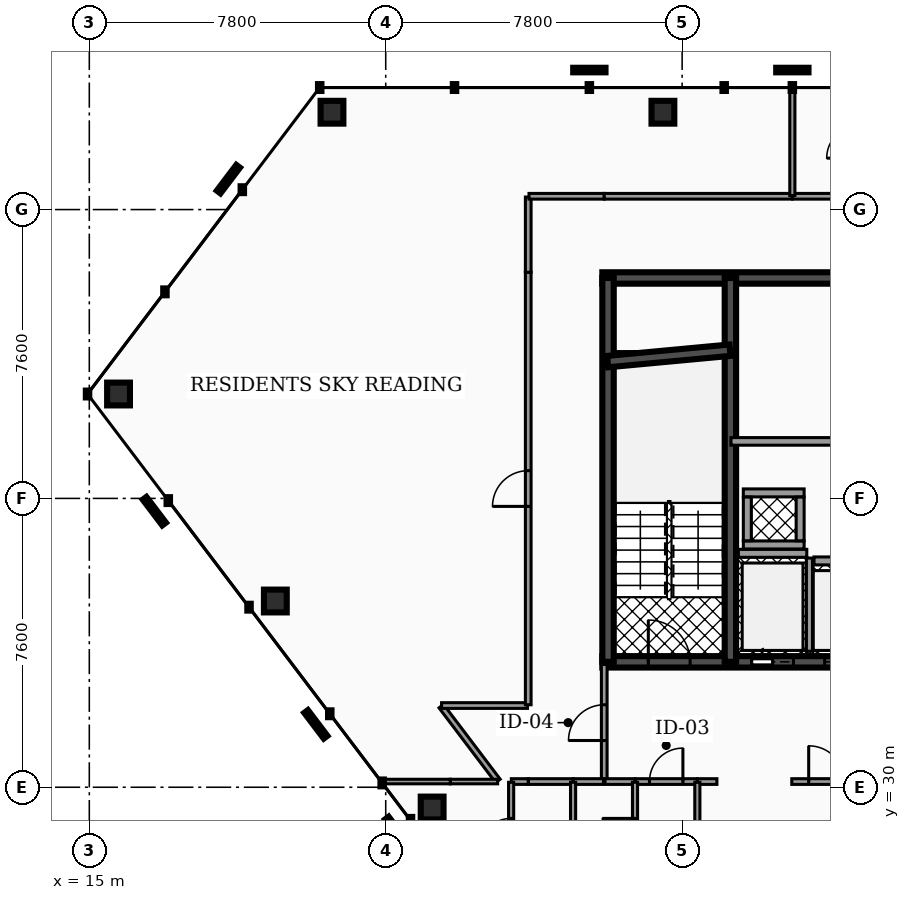
"""IFC4 building model, lengths in metres.
Left out: names, types, materials, properties, quantities, classifications, styles, units other than length and angle.
Written with IfcOpenShell. Run it as: python <this file> out.ifc"""

import sys

from ifc_helpers import new_model, si_unit, direction, frame, frame_2d, origin, origin_2d, place, context, subcontext, project, spatial, rectangle, hollow_rectangle, extrude, element, fill, save


model = new_model("IFC4")
c1 = context("Model", 3, precision=1e-05, world=origin(), true_north=direction((0.0, 1.0)))
c2 = subcontext(c1, "Body", "Model", "MODEL_VIEW")
j1 = project(units=[si_unit("LENGTHUNIT", "METRE"), si_unit("PLANEANGLEUNIT", "RADIAN")], contexts=[c1])
p1 = place(None, origin())
s1 = spatial("IfcSite", under=j1, at=p1, CompositionType="ELEMENT")
p2 = place(p1, origin())
s2 = spatial("IfcBuilding", under=s1, at=p2, CompositionType="ELEMENT")
p3 = place(p2, frame((0.0, 0.0, 215.56)))
s3 = spatial("IfcBuildingStorey", under=s2, at=p3, CompositionType="ELEMENT", Elevation=215.56)
p4 = place(p3, frame((28.5, 43.4, 0.0), z_axis=(0.0, 0.0, 1.0), x_axis=(1.0, 0.0, 0.0)))
e1 = element("IfcWall", 1, at=p4, inside=s3, PredefinedType="SHEAR", context=c2, shape_type="SweptSolid", body=[
    extrude(rectangle(XDim=19.86, YDim=0.3, at=frame_2d((9.93, 0.0))), origin(), (0.0, 0.0, 1.0), 3.18),
])
p5 = place(p3, frame((28.5, 33.3, 0.0), z_axis=(0.0, 0.0, 1.0), x_axis=(1.0, 0.0, 0.0)))
e2 = element("IfcWall", 2, at=p5, inside=s3, PredefinedType="SHEAR", context=c2, shape_type="SweptSolid", body=[
    extrude(rectangle(XDim=19.86, YDim=0.3, at=frame_2d((9.93, 0.0))), origin(), (0.0, 0.0, 1.0), 3.18),
])
p6 = place(p5, frame((3.93, 0.0, 0.0)))
e3 = element("IfcOpeningElement", 3, at=p6, cuts=e2, PredefinedType="OPENING", context=c2, shape_type="SweptSolid", body=[
    extrude(rectangle(XDim=1.1, YDim=2.15, at=frame_2d((0.55, 1.075))), frame((0.0, 0.16, 0.0), z_axis=(0.0, -1.0, 0.0), x_axis=(1.0, 0.0, 0.0)), (0.0, 0.0, 1.0), 0.32),
])
p7 = place(p5, frame((14.77, 0.0, 0.0)))
e4 = element("IfcOpeningElement", 4, at=p7, cuts=e2, PredefinedType="OPENING", context=c2, shape_type="SweptSolid", body=[
    extrude(rectangle(XDim=1.1, YDim=2.15, at=frame_2d((0.55, 1.075))), frame((0.0, 0.16, 0.0), z_axis=(0.0, -1.0, 0.0), x_axis=(1.0, 0.0, 0.0)), (0.0, 0.0, 1.0), 0.32),
])
p8 = place(p5, frame((11.25, 0.0, 0.0)))
e5 = element("IfcOpeningElement", 5, at=p8, cuts=e2, PredefinedType="OPENING", context=c2, shape_type="SweptSolid", body=[
    extrude(rectangle(XDim=1.0, YDim=2.1, at=frame_2d((0.5, 1.05))), frame((0.0, 0.16, 0.0), z_axis=(0.0, -1.0, 0.0), x_axis=(1.0, 0.0, 0.0)), (0.0, 0.0, 1.0), 0.32),
])
p9 = place(p5, frame((12.95, 0.0, 0.0)))
e6 = element("IfcOpeningElement", 6, at=p9, cuts=e2, PredefinedType="OPENING", context=c2, shape_type="SweptSolid", body=[
    extrude(rectangle(XDim=1.0, YDim=2.1, at=frame_2d((0.5, 1.05))), frame((0.0, 0.16, 0.0), z_axis=(0.0, -1.0, 0.0), x_axis=(1.0, 0.0, 0.0)), (0.0, 0.0, 1.0), 0.32),
])
p10 = place(p5, frame((5.85, 0.0, 0.0)))
e7 = element("IfcOpeningElement", 7, at=p10, cuts=e2, PredefinedType="OPENING", context=c2, shape_type="SweptSolid", body=[
    extrude(rectangle(XDim=1.0, YDim=2.1, at=frame_2d((0.5, 1.05))), frame((0.0, 0.16, 0.0), z_axis=(0.0, -1.0, 0.0), x_axis=(1.0, 0.0, 0.0)), (0.0, 0.0, 1.0), 0.32),
])
p11 = place(p5, frame((1.21, 0.0, 0.0)))
e8 = element("IfcOpeningElement", 8, at=p11, cuts=e2, PredefinedType="OPENING", context=c2, shape_type="SweptSolid", body=[
    extrude(rectangle(XDim=1.1, YDim=2.2, at=frame_2d((0.55, 1.1))), frame((0.0, 0.16, 0.0), z_axis=(0.0, -1.0, 0.0), x_axis=(1.0, 0.0, 0.0)), (0.0, 0.0, 1.0), 0.32),
])
p12 = place(p5, frame((9.34, 0.0, 0.0)))
e9 = element("IfcOpeningElement", 9, at=p12, cuts=e2, PredefinedType="OPENING", context=c2, shape_type="SweptSolid", body=[
    extrude(rectangle(XDim=1.12, YDim=2.05, at=frame_2d((0.56, 1.025))), frame((0.0, 0.16, 0.0), z_axis=(0.0, -1.0, 0.0), x_axis=(1.0, 0.0, 0.0)), (0.0, 0.0, 1.0), 0.32),
])
p13 = place(p5, frame((17.55, 0.0, 0.0)))
e10 = element("IfcOpeningElement", 10, at=p13, cuts=e2, PredefinedType="OPENING", context=c2, shape_type="SweptSolid", body=[
    extrude(rectangle(XDim=1.1, YDim=2.2, at=frame_2d((0.55, 1.1))), frame((0.0, 0.16, 0.0), z_axis=(0.0, -1.0, 0.0), x_axis=(1.0, 0.0, 0.0)), (0.0, 0.0, 1.0), 0.32),
])
for number, where, z_axis, x_axis in (
    (11, (28.65, 33.3, 0.0), (0.0, 0.0, 1.0), (0.0, 1.0, 0.0)),
    (12, (31.87, 33.3, 0.0), (0.0, 0.0, 1.0), (0.0, 1.0, 0.0)),
):
    element("IfcWall", number, at=place(p3, frame(where, z_axis=z_axis, x_axis=x_axis)), inside=s3, PredefinedType="SHEAR", context=c2, shape_type="SweptSolid", body=[
        extrude(rectangle(XDim=10.1, YDim=0.3, at=frame_2d((5.05, 0.0))), origin(), (0.0, 0.0, 1.0), 3.18),
    ])
p14 = place(p3, frame((28.64, 41.2, 0.0), z_axis=(0.0, 0.0, 1.0), x_axis=(0.995687118776, 0.092774789157, 0.0)))
e13 = element("IfcWall", 13, at=p14, inside=s3, PredefinedType="SHEAR", context=c2, shape_type="SweptSolid", body=[
    extrude(rectangle(XDim=3.234, YDim=0.3, at=frame_2d((1.617, 0.0))), origin(), (0.0, 0.0, 1.0), 3.18),
])
p15 = place(p3, frame((30.094, 47.761, 0.0), z_axis=(-0.040247349512, -0.03664425346, 0.998517575982), x_axis=(0.673233426826, -0.739430019004, 0.0)))
e14 = element("IfcColumn", 14, at=p15, inside=s3, PredefinedType="COLUMN", context=c2, shape_type="SweptSolid", body=[
    extrude(hollow_rectangle(XDim=0.6, YDim=0.6, WallThickness=0.03, at=origin_2d()), origin(), (0.0, 0.0, 1.0), 3.185),
])
p16 = place(p3, frame((21.386, 47.761, 0.0), z_axis=(-0.074369002674, -0.03657241078, 0.996559938093), x_axis=(0.441295281394, -0.89736195296, 0.0)))
e15 = element("IfcColumn", 15, at=p16, inside=s3, PredefinedType="COLUMN", context=c2, shape_type="SweptSolid", body=[
    extrude(hollow_rectangle(XDim=0.6, YDim=0.6, WallThickness=0.03, at=origin_2d()), origin(), (0.0, 0.0, 1.0), 3.191),
])
p17 = place(p3, frame((15.769, 40.347, 0.0), z_axis=(0.053875568613, 0.132295296129, 0.989745107454), x_axis=(-0.92614742371, 0.377161702131, 0.0)))
e16 = element("IfcColumn", 16, at=p17, inside=s3, PredefinedType="COLUMN", context=c2, shape_type="SweptSolid", body=[
    extrude(hollow_rectangle(XDim=0.6, YDim=0.6, WallThickness=0.03, at=origin_2d()), origin(), (0.0, 0.0, 1.0), 3.213),
])
p18 = place(p3, frame((19.895, 34.9, 0.0), z_axis=(0.066882397684, 0.115427300668, 0.991061694921), x_axis=(-0.865243995377, 0.501351003254, 0.0)))
e17 = element("IfcColumn", 17, at=p18, inside=s3, PredefinedType="COLUMN", context=c2, shape_type="SweptSolid", body=[
    extrude(hollow_rectangle(XDim=0.6, YDim=0.6, WallThickness=0.03, at=origin_2d()), origin(), (0.0, 0.0, 1.0), 3.208),
])
p19 = place(p3, frame((24.021, 29.454, 0.0), z_axis=(0.079887355875, 0.098469352856, 0.991928322471), x_axis=(-0.776573075006, 0.630027189235, 0.0)))
e18 = element("IfcColumn", 18, at=p19, inside=s3, PredefinedType="COLUMN", context=c2, shape_type="SweptSolid", body=[
    extrude(hollow_rectangle(XDim=0.6, YDim=0.6, WallThickness=0.03, at=origin_2d()), origin(), (0.0, 0.0, 1.0), 3.206),
])
p20 = place(p3, frame((32.08, 36.155, 0.0), z_axis=(0.0, 0.0, 1.0), x_axis=(1.0, 0.0, 0.0)))
e19 = element("IfcWall", 19, at=p20, inside=s3, PredefinedType="SOLIDWALL", context=c2, shape_type="SweptSolid", body=[
    extrude(rectangle(XDim=1.8, YDim=0.21, at=frame_2d((0.9, 0.0))), origin(), (0.0, 0.0, 1.0), 3.18),
])
p21 = place(p3, frame((33.95, 33.58, 0.0), z_axis=(0.0, 0.0, 1.0), x_axis=(0.0, 1.0, 0.0)))
e20 = element("IfcWall", 20, at=p21, inside=s3, PredefinedType="SOLIDWALL", context=c2, shape_type="SweptSolid", body=[
    extrude(rectangle(XDim=2.45, YDim=0.16, at=frame_2d((1.225, 0.0))), origin(), (0.0, 0.0, 1.0), 3.18),
])
p22 = place(p3, frame((34.07, 35.955, 0.0), z_axis=(0.0, 0.0, 1.0), x_axis=(1.0, 0.0, 0.0)))
e21 = element("IfcWall", 21, at=p22, inside=s3, PredefinedType="SOLIDWALL", context=c2, shape_type="SweptSolid", body=[
    extrude(rectangle(XDim=1.56, YDim=0.21, at=frame_2d((0.78, 0.0))), origin(), (0.0, 0.0, 1.0), 3.18),
])
for number, where, z_axis, x_axis in (
    (22, (32.21, 36.375, 0.0), (0.0, 0.0, 1.0), (1.0, 0.0, 0.0)),
    (23, (32.21, 37.745, 0.0), (0.0, 0.0, 1.0), (1.0, 0.0, 0.0)),
):
    element("IfcWall", number, at=place(p3, frame(where, z_axis=z_axis, x_axis=x_axis)), inside=s3, PredefinedType="SOLIDWALL", context=c2, shape_type="SweptSolid", body=[
        extrude(rectangle(XDim=1.6, YDim=0.21, at=frame_2d((0.8, 0.0))), origin(), (0.0, 0.0, 1.0), 3.18),
    ])
for number, where, z_axis, x_axis in (
    (24, (32.315, 36.485, 0.0), (0.0, 0.0, 1.0), (0.0, 1.0, 0.0)),
    (25, (33.705, 36.485, 0.0), (0.0, 0.0, 1.0), (0.0, 1.0, 0.0)),
):
    element("IfcWall", number, at=place(p3, frame(where, z_axis=z_axis, x_axis=x_axis)), inside=s3, PredefinedType="SOLIDWALL", context=c2, shape_type="SweptSolid", body=[
        extrude(rectangle(XDim=1.15, YDim=0.21, at=frame_2d((0.575, 0.0))), origin(), (0.0, 0.0, 1.0), 3.18),
    ])
p23 = place(p3, frame((31.885, 39.1, 0.0), z_axis=(0.0, 0.0, 1.0), x_axis=(1.0, 0.0, 0.0)))
e26 = element("IfcWall", 26, at=p23, inside=s3, PredefinedType="PARTITIONING", context=c2, shape_type="SweptSolid", body=[
    extrude(rectangle(XDim=5.645, YDim=0.2, at=frame_2d((2.823, 0.0))), origin(), (0.0, 0.0, 1.0), 2.235),
])
p24 = place(p3, frame((28.55, 30.17, 0.0), z_axis=(0.0, 0.0, 1.0), x_axis=(0.0, 1.0, 0.0)))
e27 = element("IfcWall", 27, at=p24, inside=s3, PredefinedType="PARTITIONING", context=c2, shape_type="SweptSolid", body=[
    extrude(rectangle(XDim=3.06, YDim=0.15, at=frame_2d((1.53, 0.0))), origin(), (0.0, 0.0, 1.0), 2.235),
])
p25 = place(p24, frame((1.06, 0.0, 0.0)))
e28 = element("IfcOpeningElement", 28, at=p25, cuts=e27, PredefinedType="OPENING", context=c2, shape_type="SweptSolid", body=[
    extrude(rectangle(XDim=0.94, YDim=2.05, at=frame_2d((0.47, 1.025))), frame((0.0, 0.085, 0.0), z_axis=(0.0, -1.0, 0.0), x_axis=(1.0, 0.0, 0.0)), (0.0, 0.0, 1.0), 0.17),
])
p26 = place(p3, frame((29.365, 30.15, 0.0), z_axis=(0.0, 0.0, 1.0), x_axis=(1.0, 0.0, 0.0)))
e29 = element("IfcWall", 29, at=p26, inside=s3, PredefinedType="PARTITIONING", context=c2, shape_type="SweptSolid", body=[
    extrude(rectangle(XDim=1.63, YDim=0.15, at=frame_2d((0.815, 0.0))), origin(), (0.0, 0.0, 1.0), 2.235),
])
p27 = place(p26, frame((0.375, 0.0, 0.0)))
e30 = element("IfcOpeningElement", 30, at=p27, cuts=e29, PredefinedType="OPENING", context=c2, shape_type="SweptSolid", body=[
    extrude(rectangle(XDim=0.88, YDim=2.05, at=frame_2d((0.44, 1.025))), frame((0.0, 0.085, 0.0), z_axis=(0.0, -1.0, 0.0), x_axis=(1.0, 0.0, 0.0)), (0.0, 0.0, 1.0), 0.17),
])
p28 = place(p3, frame((28.57, 30.15, 0.0), z_axis=(0.0, 0.0, 1.0), x_axis=(1.0, 0.0, 0.0)))
e31 = element("IfcWall", 31, at=p28, inside=s3, PredefinedType="PARTITIONING", context=c2, shape_type="SweptSolid", body=[
    extrude(rectangle(XDim=0.785, YDim=0.15, at=frame_2d((0.393, 0.0))), origin(), (0.0, 0.0, 1.0), 2.235),
])
p29 = place(p3, frame((33.485, 30.15, 0.0), z_axis=(0.0, 0.0, 1.0), x_axis=(1.0, 0.0, 0.0)))
e32 = element("IfcWall", 32, at=p29, inside=s3, PredefinedType="PARTITIONING", context=c2, shape_type="SweptSolid", body=[
    extrude(rectangle(XDim=9.83, YDim=0.15, at=frame_2d((4.915, 0.0))), origin(), (0.0, 0.0, 1.0), 2.235),
])
p30 = place(p29, frame((0.445, 0.0, 0.0)))
e33 = element("IfcOpeningElement", 33, at=p30, cuts=e32, PredefinedType="OPENING", context=c2, shape_type="SweptSolid", body=[
    extrude(rectangle(XDim=0.94, YDim=2.05, at=frame_2d((0.47, 1.025))), frame((0.0, 0.085, 0.0), z_axis=(0.0, -1.0, 0.0), x_axis=(1.0, 0.0, 0.0)), (0.0, 0.0, 1.0), 0.17),
])
p31 = place(p3, frame((31.005, 30.15, 0.0), z_axis=(0.0, 0.0, 1.0), x_axis=(1.0, 0.0, 0.0)))
e34 = element("IfcWall", 34, at=p31, inside=s3, PredefinedType="PARTITIONING", context=c2, shape_type="SweptSolid", body=[
    extrude(rectangle(XDim=0.51, YDim=0.15, at=frame_2d((0.255, 0.0))), origin(), (0.0, 0.0, 1.0), 2.235),
])
p32 = place(p3, frame((26.55, 30.15, 0.0), z_axis=(0.0, 0.0, 1.0), x_axis=(1.0, 0.0, 0.0)))
e35 = element("IfcWall", 35, at=p32, inside=s3, PredefinedType="PARTITIONING", context=c2, shape_type="SweptSolid", body=[
    extrude(rectangle(XDim=1.175, YDim=0.15, at=frame_2d((0.587, 0.0))), origin(), (0.0, 0.0, 1.0), 2.235),
])
p33 = place(p3, frame((26.105, 30.15, 0.0), z_axis=(0.0, 0.0, 1.0), x_axis=(1.0, 0.0, 0.0)))
e36 = element("IfcWall", 36, at=p33, inside=s3, PredefinedType="PARTITIONING", context=c2, shape_type="SweptSolid", body=[
    extrude(rectangle(XDim=0.445, YDim=0.15, at=frame_2d((0.223, 0.0))), origin(), (0.0, 0.0, 1.0), 2.235),
])
p34 = place(p3, frame((27.735, 30.15, 0.0), z_axis=(0.0, 0.0, 1.0), x_axis=(1.0, 0.0, 0.0)))
e37 = element("IfcWall", 37, at=p34, inside=s3, PredefinedType="PARTITIONING", context=c2, shape_type="SweptSolid", body=[
    extrude(rectangle(XDim=0.795, YDim=0.15, at=frame_2d((0.397, 0.0))), origin(), (0.0, 0.0, 1.0), 2.235),
])
p35 = place(p3, frame((24.262, 32.134, 0.0), z_axis=(0.0, 0.0, 1.0), x_axis=(0.603869110647, -0.797083494502, 0.0)))
e38 = element("IfcWall", 38, at=p35, inside=s3, PredefinedType="PARTITIONING", context=c2, shape_type="SweptSolid", body=[
    extrude(rectangle(XDim=2.469, YDim=0.15, at=frame_2d((1.234, 0.0))), origin(), (0.0, 0.0, 1.0), 2.235),
])
p36 = place(p3, frame((24.27, 32.15, 0.0), z_axis=(0.0, 0.0, 1.0), x_axis=(1.0, 0.0, 0.0)))
e39 = element("IfcWall", 39, at=p36, inside=s3, PredefinedType="PARTITIONING", context=c2, shape_type="SweptSolid", body=[
    extrude(rectangle(XDim=2.26, YDim=0.15, at=frame_2d((1.13, 0.0))), origin(), (0.0, 0.0, 1.0), 2.235),
])
p37 = place(p3, frame((26.55, 32.17, 0.0), z_axis=(0.0, 0.0, 1.0), x_axis=(0.0, 1.0, 0.0)))
e40 = element("IfcWall", 40, at=p37, inside=s3, PredefinedType="PARTITIONING", context=c2, shape_type="SweptSolid", body=[
    extrude(rectangle(XDim=11.38, YDim=0.15, at=frame_2d((5.69, 0.0))), origin(), (0.0, 0.0, 1.0), 2.235),
])
p38 = place(p37, frame((5.22, 0.0, 0.0)))
e41 = element("IfcOpeningElement", 41, at=p38, cuts=e40, PredefinedType="OPENING", context=c2, shape_type="SweptSolid", body=[
    extrude(rectangle(XDim=0.94, YDim=2.05, at=frame_2d((0.47, 1.025))), frame((0.0, 0.085, 0.0), z_axis=(0.0, -1.0, 0.0), x_axis=(1.0, 0.0, 0.0)), (0.0, 0.0, 1.0), 0.17),
])
for number, where, z_axis, x_axis in (
    (42, (26.55, 43.55, 0.0), (0.0, 0.0, 1.0), (0.0, 1.0, 0.0)),
    (43, (26.57, 45.55, 0.0), (0.0, 0.0, 1.0), (1.0, 0.0, 0.0)),
):
    element("IfcWall", number, at=place(p3, frame(where, z_axis=z_axis, x_axis=x_axis)), inside=s3, PredefinedType="PARTITIONING", context=c2, shape_type="SweptSolid", body=[
        extrude(rectangle(XDim=1.98, YDim=0.15, at=frame_2d((0.99, 0.0))), origin(), (0.0, 0.0, 1.0), 2.235),
    ])
p39 = place(p3, frame((28.55, 45.55, 0.0), z_axis=(0.0, 0.0, 1.0), x_axis=(1.0, 0.0, 0.0)))
e44 = element("IfcWall", 44, at=p39, inside=s3, PredefinedType="PARTITIONING", context=c2, shape_type="SweptSolid", body=[
    extrude(rectangle(XDim=4.945, YDim=0.15, at=frame_2d((2.473, 0.0))), origin(), (0.0, 0.0, 1.0), 2.235),
])
p40 = place(p3, frame((33.505, 45.55, 0.0), z_axis=(0.0, 0.0, 1.0), x_axis=(1.0, 0.0, 0.0)))
e45 = element("IfcWall", 45, at=p40, inside=s3, PredefinedType="PARTITIONING", context=c2, shape_type="SweptSolid", body=[
    extrude(rectangle(XDim=1.754, YDim=0.15, at=frame_2d((0.877, 0.0))), origin(), (0.0, 0.0, 1.0), 2.235),
])
p41 = place(p3, frame((29.36, 27.37, 0.0), z_axis=(0.0, 0.0, 1.0), x_axis=(0.0, 1.0, 0.0)))
e46 = element("IfcWall", 46, at=p41, inside=s3, PredefinedType="PARTITIONING", context=c2, shape_type="SweptSolid", body=[
    extrude(rectangle(XDim=2.76, YDim=0.135, at=frame_2d((1.38, 0.0))), origin(), (0.0, 0.0, 1.0), 2.235),
])
p42 = place(p41, frame((0.95, 0.0, 0.0)))
e47 = element("IfcOpeningElement", 47, at=p42, cuts=e46, PredefinedType="OPENING", context=c2, shape_type="SweptSolid", body=[
    extrude(rectangle(XDim=0.86, YDim=2.05, at=frame_2d((0.43, 1.025))), frame((0.0, 0.077, 0.0), z_axis=(0.0, -1.0, 0.0), x_axis=(1.0, 0.0, 0.0)), (0.0, 0.0, 1.0), 0.155),
])
for number, where, z_axis, x_axis in (
    (48, (31.0, 27.37, 0.0), (0.0, 0.0, 1.0), (0.0, 1.0, 0.0)),
    (49, (27.73, 27.37, 0.0), (0.0, 0.0, 1.0), (0.0, 1.0, 0.0)),
):
    element("IfcWall", number, at=place(p3, frame(where, z_axis=z_axis, x_axis=x_axis)), inside=s3, PredefinedType="PARTITIONING", context=c2, shape_type="SweptSolid", body=[
        extrude(rectangle(XDim=2.76, YDim=0.135, at=frame_2d((1.38, 0.0))), origin(), (0.0, 0.0, 1.0), 2.235),
    ])
p43 = place(p3, frame((26.1, 27.37, 0.0), z_axis=(0.0, 0.0, 1.0), x_axis=(0.0, 1.0, 0.0)))
e50 = element("IfcWall", 50, at=p43, inside=s3, PredefinedType="PARTITIONING", context=c2, shape_type="SweptSolid", body=[
    extrude(rectangle(XDim=2.76, YDim=0.135, at=frame_2d((1.38, 0.0))), origin(), (0.0, 0.0, 1.0), 2.235),
])
p44 = place(p43, frame((0.95, 0.0, 0.0)))
e51 = element("IfcOpeningElement", 51, at=p44, cuts=e50, PredefinedType="OPENING", context=c2, shape_type="SweptSolid", body=[
    extrude(rectangle(XDim=0.86, YDim=2.05, at=frame_2d((0.43, 1.025))), frame((0.0, 0.077, 0.0), z_axis=(0.0, -1.0, 0.0), x_axis=(1.0, 0.0, 0.0)), (0.0, 0.0, 1.0), 0.155),
])
p45 = place(p3, frame((24.5, 30.15, 0.0), z_axis=(0.0, 0.0, 1.0), x_axis=(1.0, 0.0, 0.0)))
e52 = element("IfcWall", 52, at=p45, inside=s3, PredefinedType="PARTITIONING", context=c2, shape_type="SweptSolid", body=[
    extrude(rectangle(XDim=1.245, YDim=0.12, at=frame_2d((0.623, 0.0))), origin(), (0.0, 0.0, 1.0), 2.235),
])
p46 = place(p3, frame((22.694, 30.15, 0.0), z_axis=(0.0, 0.0, 1.0), x_axis=(1.0, 0.0, 0.0)))
e53 = element("IfcWall", 53, at=p46, inside=s3, PredefinedType="PARTITIONING", context=c2, shape_type="SweptSolid", body=[
    extrude(rectangle(XDim=1.806, YDim=0.12, at=frame_2d((0.903, 0.0))), origin(), (0.0, 0.0, 1.0), 2.235),
])
p47 = place(p3, frame((33.5, 45.57, 0.0), z_axis=(0.0, 0.0, 1.0), x_axis=(0.0, 1.0, 0.0)))
e54 = element("IfcWall", 54, at=p47, inside=s3, PredefinedType="PARTITIONING", context=c2, shape_type="SweptSolid", body=[
    extrude(rectangle(XDim=2.826, YDim=0.135, at=frame_2d((1.413, 0.0))), origin(), (0.0, 0.0, 1.0), 2.235),
])
p48 = place(p6, origin())
e55 = element("IfcDoor", 55, at=p48, inside=s3, OperationType="SLIDING_TO_LEFT", PredefinedType="DOOR", context=c2, shape_type="SweptSolid", body=[
    extrude(rectangle(XDim=1.1, YDim=2.15, at=frame_2d((0.55, 1.075))), frame((0.0, 0.025, 0.0), z_axis=(0.0, -1.0, 0.0), x_axis=(1.0, 0.0, 0.0)), (0.0, 0.0, 1.0), 0.05),
])
fill(e3, e55)
p49 = place(p10, origin())
e56 = element("IfcDoor", 56, at=p49, inside=s3, OperationType="SLIDING_TO_RIGHT", PredefinedType="DOOR", context=c2, shape_type="SweptSolid", body=[
    extrude(rectangle(XDim=1.0, YDim=2.1, at=frame_2d((0.5, 1.05))), frame((0.0, 0.025, 0.0), z_axis=(0.0, -1.0, 0.0), x_axis=(1.0, 0.0, 0.0)), (0.0, 0.0, 1.0), 0.05),
])
fill(e7, e56)
p50 = place(p11, origin())
e57 = element("IfcDoor", 57, at=p50, inside=s3, OperationType="SINGLE_SWING_LEFT", PredefinedType="DOOR", context=c2, shape_type="SweptSolid", body=[
    extrude(rectangle(XDim=1.1, YDim=2.2, at=frame_2d((0.55, 1.1))), frame((0.0, 0.025, 0.0), z_axis=(0.0, -1.0, 0.0), x_axis=(1.0, 0.0, 0.0)), (0.0, 0.0, 1.0), 0.05),
])
fill(e8, e57)
p51 = place(p25, origin())
e58 = element("IfcDoor", 58, at=p51, inside=s3, OperationType="SINGLE_SWING_LEFT", PredefinedType="DOOR", context=c2, shape_type="SweptSolid", body=[
    extrude(rectangle(XDim=0.94, YDim=2.05, at=frame_2d((0.47, 1.025))), frame((0.0, 0.025, 0.0), z_axis=(0.0, -1.0, 0.0), x_axis=(1.0, 0.0, 0.0)), (0.0, 0.0, 1.0), 0.05),
])
fill(e28, e58)
p52 = place(p27, origin())
e59 = element("IfcDoor", 59, at=p52, inside=s3, OperationType="SINGLE_SWING_RIGHT", PredefinedType="DOOR", context=c2, shape_type="SweptSolid", body=[
    extrude(rectangle(XDim=0.88, YDim=2.05, at=frame_2d((0.44, 1.025))), frame((0.0, 0.025, 0.0), z_axis=(0.0, -1.0, 0.0), x_axis=(1.0, 0.0, 0.0)), (0.0, 0.0, 1.0), 0.05),
])
fill(e30, e59)
p53 = place(p30, origin())
e60 = element("IfcDoor", 60, at=p53, inside=s3, OperationType="SINGLE_SWING_LEFT", PredefinedType="DOOR", context=c2, shape_type="SweptSolid", body=[
    extrude(rectangle(XDim=0.94, YDim=2.05, at=frame_2d((0.47, 1.025))), frame((0.0, 0.025, 0.0), z_axis=(0.0, -1.0, 0.0), x_axis=(1.0, 0.0, 0.0)), (0.0, 0.0, 1.0), 0.05),
])
fill(e33, e60)
p54 = place(p38, origin())
e61 = element("IfcDoor", 61, at=p54, inside=s3, OperationType="SINGLE_SWING_LEFT", PredefinedType="DOOR", context=c2, shape_type="SweptSolid", body=[
    extrude(rectangle(XDim=0.94, YDim=2.05, at=frame_2d((0.47, 1.025))), frame((0.0, 0.025, 0.0), z_axis=(0.0, -1.0, 0.0), x_axis=(1.0, 0.0, 0.0)), (0.0, 0.0, 1.0), 0.05),
])
fill(e41, e61)
p55 = place(p42, origin())
e62 = element("IfcDoor", 62, at=p55, inside=s3, OperationType="SINGLE_SWING_RIGHT", PredefinedType="DOOR", context=c2, shape_type="SweptSolid", body=[
    extrude(rectangle(XDim=0.86, YDim=2.05, at=frame_2d((0.43, 1.025))), frame((0.0, 0.025, 0.0), z_axis=(0.0, -1.0, 0.0), x_axis=(1.0, 0.0, 0.0)), (0.0, 0.0, 1.0), 0.05),
])
fill(e47, e62)
p56 = place(p44, origin())
e63 = element("IfcDoor", 63, at=p56, inside=s3, OperationType="SINGLE_SWING_LEFT", PredefinedType="DOOR", context=c2, shape_type="SweptSolid", body=[
    extrude(rectangle(XDim=0.86, YDim=2.05, at=frame_2d((0.43, 1.025))), frame((0.0, 0.025, 0.0), z_axis=(0.0, -1.0, 0.0), x_axis=(1.0, 0.0, 0.0)), (0.0, 0.0, 1.0), 0.05),
])
fill(e51, e63)
save(model, sys.argv[1])
